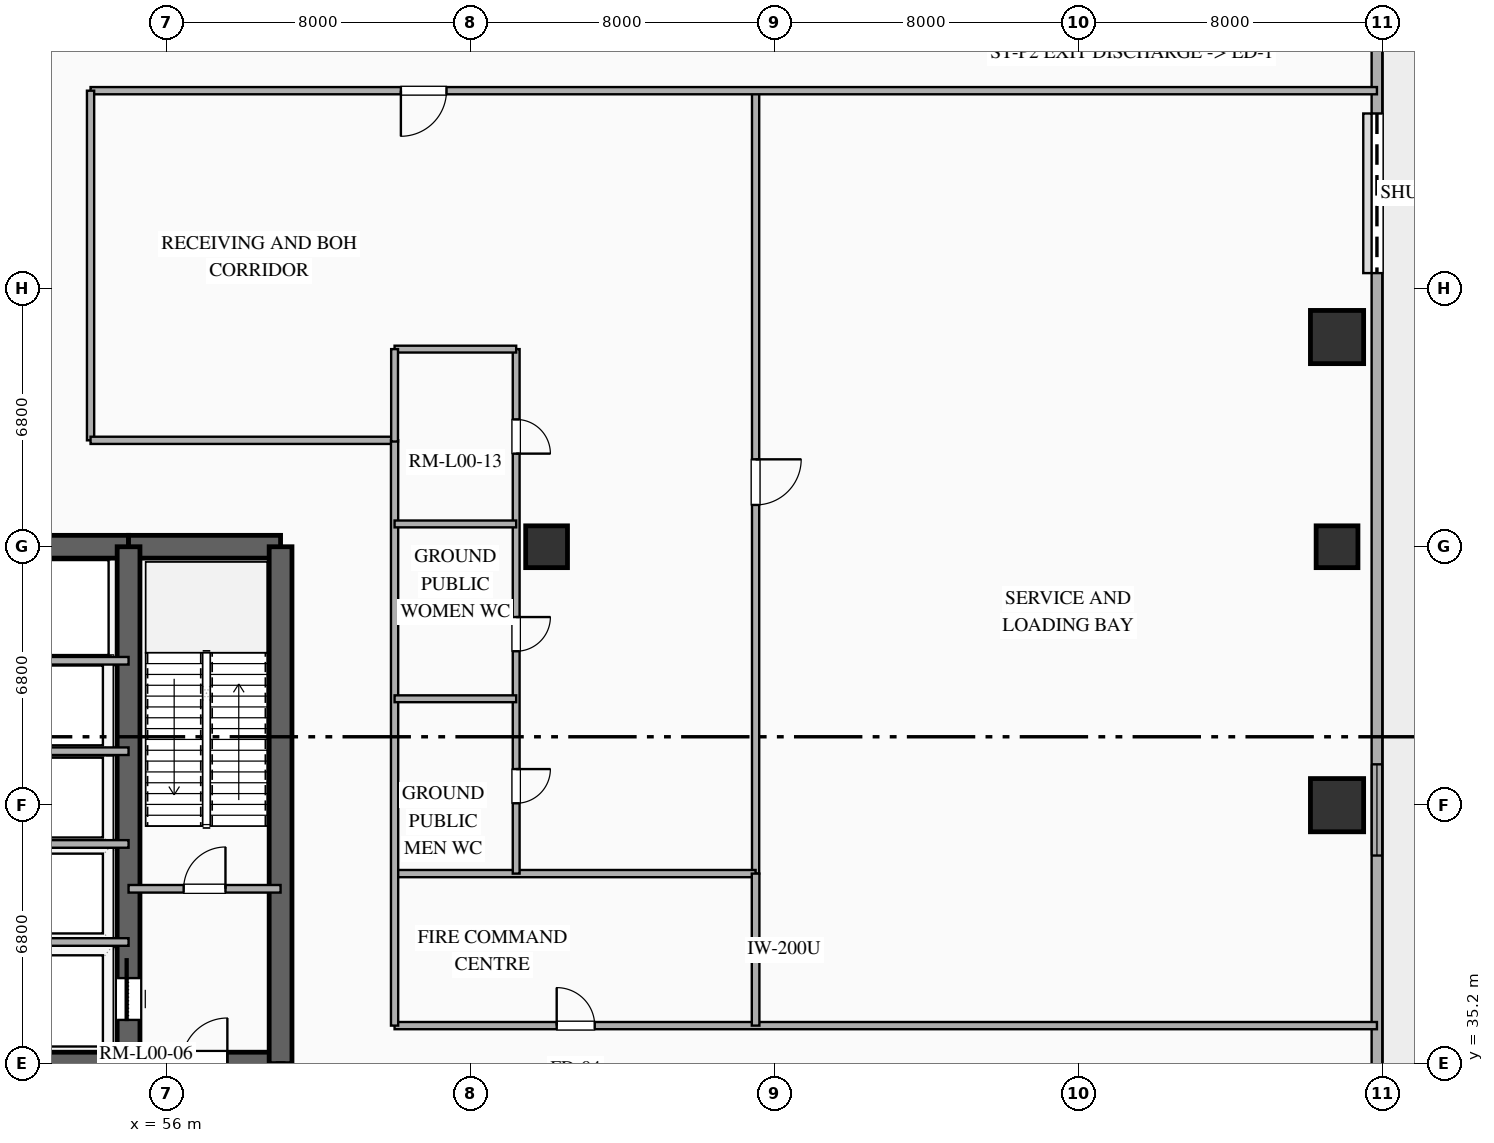
"""IFC4 building model, lengths in metres.
Left out: names, types, materials, properties, quantities, classifications, styles, units other than length and angle.
Written with IfcOpenShell. Run it as: python <this file> out.ifc"""

import sys

from ifc_helpers import new_model, si_unit, direction, frame, frame_2d, origin, origin_2d, place, context, subcontext, project, spatial, rectangle, extrude, element, fill, save


model = new_model("IFC4")
c1 = context("Model", 3, precision=1e-05, world=origin(), true_north=direction((0.0, 1.0)))
c2 = subcontext(c1, "Body", "Model", "MODEL_VIEW")
j1 = project(units=[si_unit("LENGTHUNIT", "METRE"), si_unit("PLANEANGLEUNIT", "RADIAN")], contexts=[c1])
p1 = place(None, origin())
s1 = spatial("IfcSite", under=j1, at=p1, CompositionType="ELEMENT")
p2 = place(p1, origin())
s2 = spatial("IfcBuilding", under=s1, at=p2, CompositionType="ELEMENT")
p3 = place(p2, origin())
s3 = spatial("IfcBuildingStorey", under=s2, at=p3, CompositionType="ELEMENT", Elevation=0.0)
p4 = place(p3, frame((41.0, 35.2, 0.0), z_axis=(0.0, 0.0, 1.0), x_axis=(1.0, 0.0, 0.0)))
e1 = element("IfcWall", 1, at=p4, inside=s3, PredefinedType="SHEAR", context=c2, shape_type="SweptSolid", body=[
    extrude(rectangle(XDim=14.0, YDim=0.6, at=frame_2d((7.0, 0.0))), origin(), (0.0, 0.0, 1.0), 5.72),
])
p5 = place(p4, frame((6.1, 0.0, 0.0)))
e2 = element("IfcOpeningElement", 2, at=p5, cuts=e1, PredefinedType="OPENING", context=c2, shape_type="SweptSolid", body=[
    extrude(rectangle(XDim=1.8, YDim=2.25, at=frame_2d((0.9, 1.125))), frame((0.0, 0.31, 0.0), z_axis=(0.0, -1.0, 0.0), x_axis=(1.0, 0.0, 0.0)), (0.0, 0.0, 1.0), 0.62),
])
p6 = place(p3, frame((55.0, 35.2, 0.0), z_axis=(0.0, 0.0, 1.0), x_axis=(1.0, 0.0, 0.0)))
e3 = element("IfcWall", 3, at=p6, inside=s3, PredefinedType="SHEAR", context=c2, shape_type="SweptSolid", body=[
    extrude(rectangle(XDim=4.0, YDim=0.6, at=frame_2d((2.0, 0.0))), origin(), (0.0, 0.0, 1.0), 5.72),
])
p7 = place(p6, frame((1.4, 0.0, 0.0)))
e4 = element("IfcOpeningElement", 4, at=p7, cuts=e3, PredefinedType="OPENING", context=c2, shape_type="SweptSolid", body=[
    extrude(rectangle(XDim=1.2, YDim=2.15, at=frame_2d((0.6, 1.075))), frame((0.0, 0.31, 0.0), z_axis=(0.0, -1.0, 0.0), x_axis=(1.0, 0.0, 0.0)), (0.0, 0.0, 1.0), 0.62),
])
p8 = place(p3, frame((41.0, 48.8, 0.0), z_axis=(0.0, 0.0, 1.0), x_axis=(1.0, 0.0, 0.0)))
e5 = element("IfcWall", 5, at=p8, inside=s3, PredefinedType="SHEAR", context=c2, shape_type="SweptSolid", body=[
    extrude(rectangle(XDim=14.0, YDim=0.6, at=frame_2d((7.0, 0.0))), origin(), (0.0, 0.0, 1.0), 5.72),
])
p9 = place(p8, frame((6.1, 0.0, 0.0)))
e6 = element("IfcOpeningElement", 6, at=p9, cuts=e5, PredefinedType="OPENING", context=c2, shape_type="SweptSolid", body=[
    extrude(rectangle(XDim=1.8, YDim=2.25, at=frame_2d((0.9, 1.125))), frame((0.0, 0.31, 0.0), z_axis=(0.0, -1.0, 0.0), x_axis=(1.0, 0.0, 0.0)), (0.0, 0.0, 1.0), 0.62),
])
p10 = place(p3, frame((55.0, 48.8, 0.0), z_axis=(0.0, 0.0, 1.0), x_axis=(1.0, 0.0, 0.0)))
e7 = element("IfcWall", 7, at=p10, inside=s3, PredefinedType="SHEAR", context=c2, shape_type="SweptSolid", body=[
    extrude(rectangle(XDim=4.0, YDim=0.6, at=frame_2d((2.0, 0.0))), origin(), (0.0, 0.0, 1.0), 5.72),
])
p11 = place(p3, frame((59.0, 35.2, 0.0), z_axis=(0.0, 0.0, 1.0), x_axis=(0.0, 1.0, 0.0)))
e8 = element("IfcWall", 8, at=p11, inside=s3, PredefinedType="SHEAR", context=c2, shape_type="SweptSolid", body=[
    extrude(rectangle(XDim=13.6, YDim=0.6, at=frame_2d((6.8, 0.0))), origin(), (0.0, 0.0, 1.0), 5.72),
])
p12 = place(p3, frame((55.0, 35.2, 0.0), z_axis=(0.0, 0.0, 1.0), x_axis=(0.0, 1.0, 0.0)))
e9 = element("IfcWall", 9, at=p12, inside=s3, PredefinedType="SHEAR", context=c2, shape_type="SweptSolid", body=[
    extrude(rectangle(XDim=13.6, YDim=0.6, at=frame_2d((6.8, 0.0))), origin(), (0.0, 0.0, 1.0), 5.72),
])
p13 = place(p12, frame((1.15, 0.0, 0.0)))
e10 = element("IfcOpeningElement", 10, at=p13, cuts=e9, PredefinedType="OPENING", context=c2, shape_type="SweptSolid", body=[
    extrude(rectangle(XDim=1.1, YDim=2.2, at=frame_2d((0.55, 1.1))), frame((0.0, 0.31, 0.0), z_axis=(0.0, -1.0, 0.0), x_axis=(1.0, 0.0, 0.0)), (0.0, 0.0, 1.0), 0.62),
])
for number, where, z_axis, x_axis in (
    (11, (86.8, 48.8, 0.0), (0.0, 0.0, 1.0), (1.0, 0.0, 0.0)),
    (12, (66.0, 48.8, 0.0), (0.0, 0.0, 1.0), (1.0, 0.0, 0.0)),
):
    element("IfcColumn", number, at=place(p3, frame(where, z_axis=z_axis, x_axis=x_axis)), inside=s3, PredefinedType="COLUMN", context=c2, shape_type="SweptSolid", body=[
        extrude(rectangle(XDim=1.1, YDim=1.1, at=origin_2d()), origin(), (0.0, 0.0, 1.0), 5.72),
    ])
for number, where, z_axis, x_axis in (
    (13, (86.8, 42.0, 0.0), (0.0, 0.0, 1.0), (1.0, 0.0, 0.0)),
    (14, (86.8, 54.318, 0.0), (0.0, 0.0, 1.0), (1.0, 0.0, 0.0)),
):
    element("IfcColumn", number, at=place(p3, frame(where, z_axis=z_axis, x_axis=x_axis)), inside=s3, PredefinedType="COLUMN", context=c2, shape_type="SweptSolid", body=[
        extrude(rectangle(XDim=1.4, YDim=1.4, at=origin_2d()), origin(), (0.0, 0.0, 1.0), 5.72),
    ])
p14 = place(p3, frame((87.85, 74.35, 0.0), z_axis=(0.0, 0.0, 1.0), x_axis=(0.0, -1.0, 0.0)))
e15 = element("IfcWall", 15, at=p14, inside=s3, PredefinedType="SOLIDWALL", context=c2, shape_type="SweptSolid", body=[
    extrude(rectangle(XDim=41.35, YDim=0.28, at=frame_2d((20.675, 0.0))), origin(), (0.0, 0.0, 1.0), 5.72),
])
p15 = place(p14, frame((5.35, 0.0, 0.0)))
e16 = element("IfcOpeningElement", 16, at=p15, cuts=e15, PredefinedType="OPENING", context=c2, shape_type="SweptSolid", body=[
    extrude(rectangle(XDim=2.4, YDim=2.6, at=frame_2d((1.2, 1.3))), frame((0.0, 0.15, 0.0), z_axis=(0.0, -1.0, 0.0), x_axis=(1.0, 0.0, 0.0)), (0.0, 0.0, 1.0), 0.3),
])
p16 = place(p14, frame((14.15, 0.0, 0.0)))
e17 = element("IfcOpeningElement", 17, at=p16, cuts=e15, PredefinedType="OPENING", context=c2, shape_type="SweptSolid", body=[
    extrude(rectangle(XDim=4.2, YDim=4.2, at=frame_2d((2.1, 2.1))), frame((0.0, 0.15, 0.0), z_axis=(0.0, -1.0, 0.0), x_axis=(1.0, 0.0, 0.0)), (0.0, 0.0, 1.0), 0.3),
])
p17 = place(p14, frame((31.275, 0.0, 0.9)))
e18 = element("IfcOpeningElement", 18, at=p17, cuts=e15, PredefinedType="OPENING", context=c2, shape_type="SweptSolid", body=[
    extrude(rectangle(XDim=2.4, YDim=2.6, at=frame_2d((1.2, 1.3))), frame((0.0, 0.15, 0.0), z_axis=(0.0, -1.0, 0.0), x_axis=(1.0, 0.0, 0.0)), (0.0, 0.0, 1.0), 0.3),
])
p18 = place(p3, frame((55.0, 39.8, 0.0), z_axis=(0.0, 0.0, 1.0), x_axis=(1.0, 0.0, 0.0)))
e19 = element("IfcWall", 19, at=p18, inside=s3, PredefinedType="SOLIDWALL", context=c2, shape_type="SweptSolid", body=[
    extrude(rectangle(XDim=4.0, YDim=0.2, at=frame_2d((2.0, 0.0))), origin(), (0.0, 0.0, 1.0), 4.92),
])
p19 = place(p18, frame((1.45, 0.0, 0.0)))
e20 = element("IfcOpeningElement", 20, at=p19, cuts=e19, PredefinedType="OPENING", context=c2, shape_type="SweptSolid", body=[
    extrude(rectangle(XDim=1.1, YDim=2.15, at=frame_2d((0.55, 1.075))), frame((0.0, 0.11, 0.0), z_axis=(0.0, -1.0, 0.0), x_axis=(1.0, 0.0, 0.0)), (0.0, 0.0, 1.0), 0.22),
])
for number, where, z_axis, x_axis in (
    (21, (52.05, 38.4, 0.0), (0.0, 0.0, 1.0), (1.0, 0.0, 0.0)),
    (22, (52.05, 40.98, 0.0), (0.0, 0.0, 1.0), (1.0, 0.0, 0.0)),
    (23, (52.05, 43.42, 0.0), (0.0, 0.0, 1.0), (1.0, 0.0, 0.0)),
    (24, (52.05, 45.8, 0.0), (0.0, 0.0, 1.0), (1.0, 0.0, 0.0)),
):
    element("IfcWall", number, at=place(p3, frame(where, z_axis=z_axis, x_axis=x_axis)), inside=s3, PredefinedType="SOLIDWALL", context=c2, shape_type="SweptSolid", body=[
        extrude(rectangle(XDim=2.95, YDim=0.2, at=frame_2d((1.475, 0.0))), origin(), (0.0, 0.0, 1.0), 4.92),
    ])
p20 = place(p3, frame((71.5, 60.8, 0.0), z_axis=(0.0, 0.0, 1.0), x_axis=(0.0, -1.0, 0.0)))
e25 = element("IfcWall", 25, at=p20, inside=s3, PredefinedType="PARTITIONING", context=c2, shape_type="SweptSolid", body=[
    extrude(rectangle(XDim=20.6, YDim=0.19, at=frame_2d((10.3, 0.0))), origin(), (0.0, 0.0, 1.0), 4.92),
])
p21 = place(p20, frame((9.7, 0.0, 0.0)))
e26 = element("IfcOpeningElement", 26, at=p21, cuts=e25, PredefinedType="OPENING", context=c2, shape_type="SweptSolid", body=[
    extrude(rectangle(XDim=1.2, YDim=2.15, at=frame_2d((0.6, 1.075))), frame((0.0, 0.105, 0.0), z_axis=(0.0, -1.0, 0.0), x_axis=(1.0, 0.0, 0.0)), (0.0, 0.0, 1.0), 0.21),
])
p22 = place(p3, frame((87.85, 60.8, 0.0), z_axis=(0.0, 0.0, 1.0), x_axis=(-1.0, 0.0, 0.0)))
e27 = element("IfcWall", 27, at=p22, inside=s3, PredefinedType="PARTITIONING", context=c2, shape_type="SweptSolid", body=[
    extrude(rectangle(XDim=33.85, YDim=0.19, at=frame_2d((16.925, 0.0))), origin(), (0.0, 0.0, 1.0), 4.92),
])
p23 = place(p22, frame((24.484, 0.0, 0.0)))
e28 = element("IfcOpeningElement", 28, at=p23, cuts=e27, PredefinedType="OPENING", context=c2, shape_type="SweptSolid", body=[
    extrude(rectangle(XDim=1.2, YDim=2.25, at=frame_2d((0.6, 1.125))), frame((0.0, 0.105, 0.0), z_axis=(0.0, -1.0, 0.0), x_axis=(1.0, 0.0, 0.0)), (0.0, 0.0, 1.0), 0.21),
])
p24 = place(p3, frame((62.0, 36.2, 0.0), z_axis=(0.0, 0.0, 1.0), x_axis=(1.0, 0.0, 0.0)))
e29 = element("IfcWall", 29, at=p24, inside=s3, PredefinedType="PARTITIONING", context=c2, shape_type="SweptSolid", body=[
    extrude(rectangle(XDim=25.85, YDim=0.19, at=frame_2d((12.925, 0.0))), origin(), (0.0, 0.0, 1.0), 4.92),
])
p25 = place(p24, frame((4.266, 0.0, 0.0)))
e30 = element("IfcOpeningElement", 30, at=p25, cuts=e29, PredefinedType="OPENING", context=c2, shape_type="SweptSolid", body=[
    extrude(rectangle(XDim=1.0, YDim=2.15, at=frame_2d((0.5, 1.075))), frame((0.0, 0.105, 0.0), z_axis=(0.0, -1.0, 0.0), x_axis=(1.0, 0.0, 0.0)), (0.0, 0.0, 1.0), 0.21),
])
p26 = place(p3, frame((54.0, 60.8, 0.0), z_axis=(0.0, 0.0, 1.0), x_axis=(0.0, -1.0, 0.0)))
e31 = element("IfcWall", 31, at=p26, inside=s3, PredefinedType="PARTITIONING", context=c2, shape_type="SweptSolid", body=[
    extrude(rectangle(XDim=9.2, YDim=0.19, at=frame_2d((4.6, 0.0))), origin(), (0.0, 0.0, 1.0), 4.92),
])
p27 = place(p3, frame((54.0, 51.6, 0.0), z_axis=(0.0, 0.0, 1.0), x_axis=(1.0, 0.0, 0.0)))
e32 = element("IfcWall", 32, at=p27, inside=s3, PredefinedType="PARTITIONING", context=c2, shape_type="SweptSolid", body=[
    extrude(rectangle(XDim=8.0, YDim=0.19, at=frame_2d((4.0, 0.0))), origin(), (0.0, 0.0, 1.0), 4.92),
])
p28 = place(p3, frame((62.0, 40.2, 0.0), z_axis=(0.0, 0.0, 1.0), x_axis=(1.0, 0.0, 0.0)))
e33 = element("IfcWall", 33, at=p28, inside=s3, PredefinedType="PARTITIONING", context=c2, shape_type="SweptSolid", body=[
    extrude(rectangle(XDim=9.5, YDim=0.19, at=frame_2d((4.75, 0.0))), origin(), (0.0, 0.0, 1.0), 4.92),
])
p29 = place(p3, frame((62.0, 51.6, 0.0), z_axis=(0.0, 0.0, 1.0), x_axis=(0.0, -1.0, 0.0)))
e34 = element("IfcWall", 34, at=p29, inside=s3, PredefinedType="PARTITIONING", context=c2, shape_type="SweptSolid", body=[
    extrude(rectangle(XDim=15.4, YDim=0.19, at=frame_2d((7.7, 0.0))), origin(), (0.0, 0.0, 1.0), 4.92),
])
p30 = place(p3, frame((65.2, 54.0, 0.0), z_axis=(0.0, 0.0, 1.0), x_axis=(0.0, -1.0, 0.0)))
e35 = element("IfcWall", 35, at=p30, inside=s3, PredefinedType="PLUMBINGWALL", context=c2, shape_type="SweptSolid", body=[
    extrude(rectangle(XDim=13.8, YDim=0.18, at=frame_2d((6.9, 0.0))), origin(), (0.0, 0.0, 1.0), 4.92),
])
p31 = place(p30, frame((7.05, 0.0, 0.0)))
e36 = element("IfcOpeningElement", 36, at=p31, cuts=e35, PredefinedType="OPENING", context=c2, shape_type="SweptSolid", body=[
    extrude(rectangle(XDim=0.9, YDim=2.1, at=frame_2d((0.45, 1.05))), frame((0.0, 0.1, 0.0), z_axis=(0.0, -1.0, 0.0), x_axis=(1.0, 0.0, 0.0)), (0.0, 0.0, 1.0), 0.2),
])
p32 = place(p30, frame((1.85, 0.0, 0.0)))
e37 = element("IfcOpeningElement", 37, at=p32, cuts=e35, PredefinedType="OPENING", context=c2, shape_type="SweptSolid", body=[
    extrude(rectangle(XDim=0.9, YDim=2.1, at=frame_2d((0.45, 1.05))), frame((0.0, 0.1, 0.0), z_axis=(0.0, -1.0, 0.0), x_axis=(1.0, 0.0, 0.0)), (0.0, 0.0, 1.0), 0.2),
])
p33 = place(p30, frame((11.05, 0.0, 0.0)))
e38 = element("IfcOpeningElement", 38, at=p33, cuts=e35, PredefinedType="OPENING", context=c2, shape_type="SweptSolid", body=[
    extrude(rectangle(XDim=0.9, YDim=2.1, at=frame_2d((0.45, 1.05))), frame((0.0, 0.1, 0.0), z_axis=(0.0, -1.0, 0.0), x_axis=(1.0, 0.0, 0.0)), (0.0, 0.0, 1.0), 0.2),
])
p34 = place(p3, frame((71.5, 40.2, 0.0), z_axis=(0.0, 0.0, 1.0), x_axis=(0.0, -1.0, 0.0)))
e39 = element("IfcWall", 39, at=p34, inside=s3, PredefinedType="PARTITIONING", context=c2, shape_type="SweptSolid", body=[
    extrude(rectangle(XDim=4.0, YDim=0.2, at=frame_2d((2.0, 0.0))), origin(), (0.0, 0.0, 1.0), 4.92),
])
for number, where, z_axis, x_axis in (
    (40, (62.0, 44.8, 0.0), (0.0, 0.0, 1.0), (1.0, 0.0, 0.0)),
    (41, (62.0, 49.4, 0.0), (0.0, 0.0, 1.0), (1.0, 0.0, 0.0)),
    (42, (62.0, 54.0, 0.0), (0.0, 0.0, 1.0), (1.0, 0.0, 0.0)),
):
    element("IfcWall", number, at=place(p3, frame(where, z_axis=z_axis, x_axis=x_axis)), inside=s3, PredefinedType="PLUMBINGWALL", context=c2, shape_type="SweptSolid", body=[
        extrude(rectangle(XDim=3.2, YDim=0.18, at=frame_2d((1.6, 0.0))), origin(), (0.0, 0.0, 1.0), 4.92),
    ])
p35 = place(p3, frame((62.0, 51.568, 0.0), z_axis=(0.0, 0.0, 1.0), x_axis=(0.0, 1.0, 0.0)))
e43 = element("IfcWall", 43, at=p35, inside=s3, PredefinedType="PLUMBINGWALL", context=c2, shape_type="SweptSolid", body=[
    extrude(rectangle(XDim=2.432, YDim=0.18, at=frame_2d((1.216, 0.0))), origin(), (0.0, 0.0, 1.0), 4.92),
])
p36 = place(p3, frame((59.0, 33.15, 0.0), z_axis=(0.0, 0.0, 1.0), x_axis=(0.0, 1.0, 0.0)))
e44 = element("IfcWall", 44, at=p36, inside=s3, PredefinedType="PARTITIONING", context=c2, shape_type="SweptSolid", body=[
    extrude(rectangle(XDim=2.082, YDim=0.19, at=frame_2d((1.041, 0.0))), origin(), (0.0, 0.0, 1.0), 4.92),
])
p37 = place(p36, frame((0.591, 0.0, 0.0)))
e45 = element("IfcOpeningElement", 45, at=p37, cuts=e44, PredefinedType="OPENING", context=c2, shape_type="SweptSolid", body=[
    extrude(rectangle(XDim=0.9, YDim=2.15, at=frame_2d((0.45, 1.075))), frame((0.0, 0.105, 0.0), z_axis=(0.0, -1.0, 0.0), x_axis=(1.0, 0.0, 0.0)), (0.0, 0.0, 1.0), 0.21),
])
p38 = place(p16, origin())
e46 = element("IfcDoor", 46, at=p38, inside=s3, OperationType="ROLLINGUP", PredefinedType="GATE", context=c2, shape_type="SweptSolid", body=[
    extrude(rectangle(XDim=4.2, YDim=4.2, at=frame_2d((2.1, 2.1))), frame((0.0, 0.025, 0.0), z_axis=(0.0, -1.0, 0.0), x_axis=(1.0, 0.0, 0.0)), (0.0, 0.0, 1.0), 0.05),
])
fill(e17, e46)
p39 = place(p17, origin())
e47 = element("IfcWindow", 47, at=p39, inside=s3, PartitioningType="SINGLE_PANEL", PredefinedType="WINDOW", context=c2, shape_type="SweptSolid", body=[
    extrude(rectangle(XDim=2.4, YDim=2.6, at=frame_2d((1.2, 1.3))), frame((0.0, 0.03, 0.0), z_axis=(0.0, -1.0, 0.0), x_axis=(1.0, 0.0, 0.0)), (0.0, 0.0, 1.0), 0.06),
])
fill(e18, e47)
p40 = place(p13, origin())
e48 = element("IfcDoor", 48, at=p40, inside=s3, OperationType="SLIDING_TO_RIGHT", PredefinedType="DOOR", context=c2, shape_type="SweptSolid", body=[
    extrude(rectangle(XDim=1.1, YDim=2.2, at=frame_2d((0.55, 1.1))), frame((0.0, 0.025, 0.0), z_axis=(0.0, -1.0, 0.0), x_axis=(1.0, 0.0, 0.0)), (0.0, 0.0, 1.0), 0.05),
])
fill(e10, e48)
p41 = place(p7, origin())
e49 = element("IfcDoor", 49, at=p41, inside=s3, OperationType="SINGLE_SWING_RIGHT", PredefinedType="DOOR", context=c2, shape_type="SweptSolid", body=[
    extrude(rectangle(XDim=1.2, YDim=2.15, at=frame_2d((0.6, 1.075))), frame((0.0, 0.025, 0.0), z_axis=(0.0, -1.0, 0.0), x_axis=(1.0, 0.0, 0.0)), (0.0, 0.0, 1.0), 0.05),
])
fill(e4, e49)
p42 = place(p19, origin())
e50 = element("IfcDoor", 50, at=p42, inside=s3, OperationType="SINGLE_SWING_RIGHT", PredefinedType="DOOR", context=c2, shape_type="SweptSolid", body=[
    extrude(rectangle(XDim=1.1, YDim=2.15, at=frame_2d((0.55, 1.075))), frame((0.0, 0.025, 0.0), z_axis=(0.0, -1.0, 0.0), x_axis=(1.0, 0.0, 0.0)), (0.0, 0.0, 1.0), 0.05),
])
fill(e20, e50)
p43 = place(p21, origin())
e51 = element("IfcDoor", 51, at=p43, inside=s3, OperationType="SINGLE_SWING_LEFT", PredefinedType="DOOR", context=c2, shape_type="SweptSolid", body=[
    extrude(rectangle(XDim=1.2, YDim=2.15, at=frame_2d((0.6, 1.075))), frame((0.0, 0.025, 0.0), z_axis=(0.0, -1.0, 0.0), x_axis=(1.0, 0.0, 0.0)), (0.0, 0.0, 1.0), 0.05),
])
fill(e26, e51)
p44 = place(p23, origin())
e52 = element("IfcDoor", 52, at=p44, inside=s3, OperationType="SINGLE_SWING_RIGHT", PredefinedType="DOOR", context=c2, shape_type="SweptSolid", body=[
    extrude(rectangle(XDim=1.2, YDim=2.25, at=frame_2d((0.6, 1.125))), frame((0.0, 0.025, 0.0), z_axis=(0.0, -1.0, 0.0), x_axis=(1.0, 0.0, 0.0)), (0.0, 0.0, 1.0), 0.05),
])
fill(e28, e52)
p45 = place(p25, origin())
e53 = element("IfcDoor", 53, at=p45, inside=s3, OperationType="SINGLE_SWING_LEFT", PredefinedType="DOOR", context=c2, shape_type="SweptSolid", body=[
    extrude(rectangle(XDim=1.0, YDim=2.15, at=frame_2d((0.5, 1.075))), frame((0.0, 0.025, 0.0), z_axis=(0.0, -1.0, 0.0), x_axis=(1.0, 0.0, 0.0)), (0.0, 0.0, 1.0), 0.05),
])
fill(e30, e53)
p46 = place(p31, origin())
e54 = element("IfcDoor", 54, at=p46, inside=s3, OperationType="SINGLE_SWING_LEFT", PredefinedType="DOOR", context=c2, shape_type="SweptSolid", body=[
    extrude(rectangle(XDim=0.9, YDim=2.1, at=frame_2d((0.45, 1.05))), frame((0.0, 0.025, 0.0), z_axis=(0.0, -1.0, 0.0), x_axis=(1.0, 0.0, 0.0)), (0.0, 0.0, 1.0), 0.05),
])
fill(e36, e54)
p47 = place(p32, origin())
e55 = element("IfcDoor", 55, at=p47, inside=s3, OperationType="SINGLE_SWING_RIGHT", PredefinedType="DOOR", context=c2, shape_type="SweptSolid", body=[
    extrude(rectangle(XDim=0.9, YDim=2.1, at=frame_2d((0.45, 1.05))), frame((0.0, 0.025, 0.0), z_axis=(0.0, -1.0, 0.0), x_axis=(1.0, 0.0, 0.0)), (0.0, 0.0, 1.0), 0.05),
])
fill(e37, e55)
p48 = place(p33, origin())
e56 = element("IfcDoor", 56, at=p48, inside=s3, OperationType="SINGLE_SWING_LEFT", PredefinedType="DOOR", context=c2, shape_type="SweptSolid", body=[
    extrude(rectangle(XDim=0.9, YDim=2.1, at=frame_2d((0.45, 1.05))), frame((0.0, 0.025, 0.0), z_axis=(0.0, -1.0, 0.0), x_axis=(1.0, 0.0, 0.0)), (0.0, 0.0, 1.0), 0.05),
])
fill(e38, e56)
save(model, sys.argv[1])
